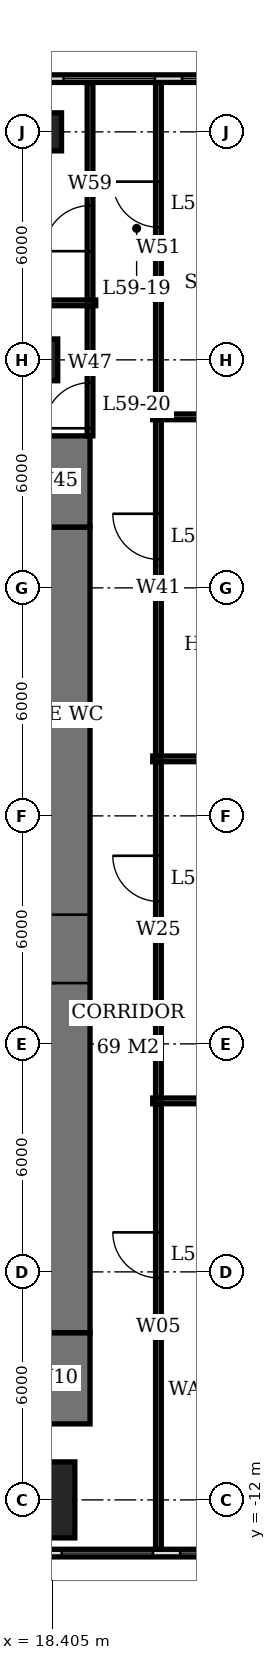
"""IFC4 building model, lengths in metres.
Left out: names, types, materials, properties, quantities, classifications, styles, units other than length and angle.
Written with IfcOpenShell. Run it as: python <this file> out.ifc"""

import sys

from ifc_helpers import new_model, si_unit, direction, frame, frame_2d, origin, origin_2d, place, context, subcontext, project, spatial, rectangle, extrude, element, fill, save


model = new_model("IFC4")
c1 = context("Model", 3, precision=1e-05, world=origin(), true_north=direction((0.0, 1.0)))
c2 = subcontext(c1, "Body", "Model", "MODEL_VIEW")
j1 = project(units=[si_unit("LENGTHUNIT", "METRE"), si_unit("PLANEANGLEUNIT", "RADIAN")], contexts=[c1])
p1 = place(None, origin())
s1 = spatial("IfcSite", under=j1, at=p1, CompositionType="ELEMENT")
p2 = place(p1, origin())
s2 = spatial("IfcBuilding", under=s1, at=p2, CompositionType="ELEMENT")
p3 = place(p2, frame((0.0, 0.0, 239.6)))
s3 = spatial("IfcBuildingStorey", under=s2, at=p3, CompositionType="ELEMENT", Elevation=239.6)
p4 = place(p3, frame((18.0, -12.0, 0.0), z_axis=(0.0, 0.0, 1.0), x_axis=(1.0, 0.0, 0.0)))
e1 = element("IfcColumn", 1, at=p4, inside=s3, PredefinedType="COLUMN", context=c2, shape_type="SweptSolid", body=[
    extrude(rectangle(XDim=2.0, YDim=2.0, at=origin_2d()), origin(), (0.0, 0.0, 1.0), 5.4),
])
p5 = place(p3, frame((18.0, 18.0, 0.0), z_axis=(0.0, 0.0, 1.0), x_axis=(1.0, 0.0, 0.0)))
e2 = element("IfcColumn", 2, at=p5, inside=s3, PredefinedType="COLUMN", context=c2, shape_type="SweptSolid", body=[
    extrude(rectangle(XDim=1.1, YDim=1.1, at=origin_2d()), origin(), (0.0, 0.0, 1.0), 5.4),
])
p6 = place(p3, frame((18.0, 24.0, 0.0), z_axis=(0.0, 0.0, 1.0), x_axis=(1.0, 0.0, 0.0)))
e3 = element("IfcColumn", 3, at=p6, inside=s3, PredefinedType="COLUMN", context=c2, shape_type="SweptSolid", body=[
    extrude(rectangle(XDim=1.3, YDim=1.0, at=origin_2d()), origin(), (0.0, 0.0, 1.0), 5.4),
])
p7 = place(p3, frame((18.5, -7.6, 0.0), z_axis=(0.0, 0.0, 1.0), x_axis=(0.0, 1.0, 0.0)))
e4 = element("IfcWall", 4, at=p7, inside=s3, PredefinedType="SHEAR", context=c2, shape_type="SweptSolid", body=[
    extrude(rectangle(XDim=21.2, YDim=1.8, at=frame_2d((10.6, 0.0))), origin(), (0.0, 0.0, 1.0), 5.4),
])
p8 = place(p7, frame((9.2, 0.0, 0.0)))
e5 = element("IfcOpeningElement", 5, at=p8, cuts=e4, PredefinedType="OPENING", context=c2, shape_type="SweptSolid", body=[
    extrude(rectangle(XDim=1.8, YDim=2.4, at=frame_2d((0.9, 1.2))), frame((0.0, 0.91, 0.0), z_axis=(0.0, -1.0, 0.0), x_axis=(1.0, 0.0, 0.0)), (0.0, 0.0, 1.0), 1.82),
])
for number, where, z_axis, x_axis in (
    (6, (18.5, -10.0, 0.0), (0.0, 0.0, 1.0), (0.0, 1.0, 0.0)),
    (7, (18.5, 13.6, 0.0), (0.0, 0.0, 1.0), (0.0, 1.0, 0.0)),
):
    element("IfcWall", number, at=place(p3, frame(where, z_axis=z_axis, x_axis=x_axis)), inside=s3, PredefinedType="SHEAR", context=c2, shape_type="SweptSolid", body=[
        extrude(rectangle(XDim=2.4, YDim=1.8, at=frame_2d((1.2, 0.0))), origin(), (0.0, 0.0, 1.0), 5.4),
    ])
p9 = place(p3, frame((-6.63, -13.4, 0.0), z_axis=(0.0, 0.0, 1.0), x_axis=(1.0, 0.0, 0.0)))
e8 = element("IfcWall", 8, at=p9, inside=s3, PredefinedType="USERDEFINED", context=c2, shape_type="SweptSolid", body=[
    extrude(rectangle(XDim=31.26, YDim=0.2, at=frame_2d((15.63, 0.0))), origin(), (0.0, 0.0, 1.0), 5.4),
])
p10 = place(p9, frame((0.358, 0.0, 0.6)))
e9 = element("IfcOpeningElement", 9, at=p10, cuts=e8, PredefinedType="OPENING", context=c2, shape_type="SweptSolid", body=[
    extrude(rectangle(XDim=2.4, YDim=3.0, at=frame_2d((1.2, 1.5))), frame((0.0, 0.11, 0.0), z_axis=(0.0, -1.0, 0.0), x_axis=(1.0, 0.0, 0.0)), (0.0, 0.0, 1.0), 0.22),
])
p11 = place(p9, frame((3.474, 0.0, 0.6)))
e10 = element("IfcOpeningElement", 10, at=p11, cuts=e8, PredefinedType="OPENING", context=c2, shape_type="SweptSolid", body=[
    extrude(rectangle(XDim=2.4, YDim=3.0, at=frame_2d((1.2, 1.5))), frame((0.0, 0.11, 0.0), z_axis=(0.0, -1.0, 0.0), x_axis=(1.0, 0.0, 0.0)), (0.0, 0.0, 1.0), 0.22),
])
p12 = place(p9, frame((6.59, 0.0, 0.6)))
e11 = element("IfcOpeningElement", 11, at=p12, cuts=e8, PredefinedType="OPENING", context=c2, shape_type="SweptSolid", body=[
    extrude(rectangle(XDim=2.4, YDim=3.0, at=frame_2d((1.2, 1.5))), frame((0.0, 0.11, 0.0), z_axis=(0.0, -1.0, 0.0), x_axis=(1.0, 0.0, 0.0)), (0.0, 0.0, 1.0), 0.22),
])
p13 = place(p9, frame((9.706, 0.0, 0.6)))
e12 = element("IfcOpeningElement", 12, at=p13, cuts=e8, PredefinedType="OPENING", context=c2, shape_type="SweptSolid", body=[
    extrude(rectangle(XDim=2.4, YDim=3.0, at=frame_2d((1.2, 1.5))), frame((0.0, 0.11, 0.0), z_axis=(0.0, -1.0, 0.0), x_axis=(1.0, 0.0, 0.0)), (0.0, 0.0, 1.0), 0.22),
])
p14 = place(p9, frame((13.572, 0.0, 0.0)))
e13 = element("IfcOpeningElement", 13, at=p14, cuts=e8, PredefinedType="OPENING", context=c2, shape_type="SweptSolid", body=[
    extrude(rectangle(XDim=1.0, YDim=2.1, at=frame_2d((0.5, 1.05))), frame((0.0, 0.11, 0.0), z_axis=(0.0, -1.0, 0.0), x_axis=(1.0, 0.0, 0.0)), (0.0, 0.0, 1.0), 0.22),
])
p15 = place(p9, frame((15.938, 0.0, 0.6)))
e14 = element("IfcOpeningElement", 14, at=p15, cuts=e8, PredefinedType="OPENING", context=c2, shape_type="SweptSolid", body=[
    extrude(rectangle(XDim=2.4, YDim=3.0, at=frame_2d((1.2, 1.5))), frame((0.0, 0.11, 0.0), z_axis=(0.0, -1.0, 0.0), x_axis=(1.0, 0.0, 0.0)), (0.0, 0.0, 1.0), 0.22),
])
p16 = place(p9, frame((19.054, 0.0, 0.6)))
e15 = element("IfcOpeningElement", 15, at=p16, cuts=e8, PredefinedType="OPENING", context=c2, shape_type="SweptSolid", body=[
    extrude(rectangle(XDim=2.4, YDim=3.0, at=frame_2d((1.2, 1.5))), frame((0.0, 0.11, 0.0), z_axis=(0.0, -1.0, 0.0), x_axis=(1.0, 0.0, 0.0)), (0.0, 0.0, 1.0), 0.22),
])
p17 = place(p9, frame((22.17, 0.0, 0.6)))
e16 = element("IfcOpeningElement", 16, at=p17, cuts=e8, PredefinedType="OPENING", context=c2, shape_type="SweptSolid", body=[
    extrude(rectangle(XDim=2.4, YDim=3.0, at=frame_2d((1.2, 1.5))), frame((0.0, 0.11, 0.0), z_axis=(0.0, -1.0, 0.0), x_axis=(1.0, 0.0, 0.0)), (0.0, 0.0, 1.0), 0.22),
])
p18 = place(p9, frame((25.286, 0.0, 0.6)))
e17 = element("IfcOpeningElement", 17, at=p18, cuts=e8, PredefinedType="OPENING", context=c2, shape_type="SweptSolid", body=[
    extrude(rectangle(XDim=2.4, YDim=3.0, at=frame_2d((1.2, 1.5))), frame((0.0, 0.11, 0.0), z_axis=(0.0, -1.0, 0.0), x_axis=(1.0, 0.0, 0.0)), (0.0, 0.0, 1.0), 0.22),
])
p19 = place(p9, frame((28.402, 0.0, 0.6)))
e18 = element("IfcOpeningElement", 18, at=p19, cuts=e8, PredefinedType="OPENING", context=c2, shape_type="SweptSolid", body=[
    extrude(rectangle(XDim=2.4, YDim=3.0, at=frame_2d((1.2, 1.5))), frame((0.0, 0.11, 0.0), z_axis=(0.0, -1.0, 0.0), x_axis=(1.0, 0.0, 0.0)), (0.0, 0.0, 1.0), 0.22),
])
p20 = place(p3, frame((24.58, 25.4, 0.0), z_axis=(0.0, 0.0, 1.0), x_axis=(-1.0, 0.0, 0.0)))
e19 = element("IfcWall", 19, at=p20, inside=s3, PredefinedType="USERDEFINED", context=c2, shape_type="SweptSolid", body=[
    extrude(rectangle(XDim=31.16, YDim=0.2, at=frame_2d((15.58, 0.0))), origin(), (0.0, 0.0, 1.0), 5.4),
])
p21 = place(p20, frame((0.358, 0.0, 0.6)))
e20 = element("IfcOpeningElement", 20, at=p21, cuts=e19, PredefinedType="OPENING", context=c2, shape_type="SweptSolid", body=[
    extrude(rectangle(XDim=2.4, YDim=3.0, at=frame_2d((1.2, 1.5))), frame((0.0, 0.11, 0.0), z_axis=(0.0, -1.0, 0.0), x_axis=(1.0, 0.0, 0.0)), (0.0, 0.0, 1.0), 0.22),
])
p22 = place(p20, frame((3.474, 0.0, 0.6)))
e21 = element("IfcOpeningElement", 21, at=p22, cuts=e19, PredefinedType="OPENING", context=c2, shape_type="SweptSolid", body=[
    extrude(rectangle(XDim=2.4, YDim=3.0, at=frame_2d((1.2, 1.5))), frame((0.0, 0.11, 0.0), z_axis=(0.0, -1.0, 0.0), x_axis=(1.0, 0.0, 0.0)), (0.0, 0.0, 1.0), 0.22),
])
p23 = place(p20, frame((6.59, 0.0, 0.6)))
e22 = element("IfcOpeningElement", 22, at=p23, cuts=e19, PredefinedType="OPENING", context=c2, shape_type="SweptSolid", body=[
    extrude(rectangle(XDim=2.4, YDim=3.0, at=frame_2d((1.2, 1.5))), frame((0.0, 0.11, 0.0), z_axis=(0.0, -1.0, 0.0), x_axis=(1.0, 0.0, 0.0)), (0.0, 0.0, 1.0), 0.22),
])
p24 = place(p20, frame((9.706, 0.0, 0.6)))
e23 = element("IfcOpeningElement", 23, at=p24, cuts=e19, PredefinedType="OPENING", context=c2, shape_type="SweptSolid", body=[
    extrude(rectangle(XDim=2.4, YDim=3.0, at=frame_2d((1.2, 1.5))), frame((0.0, 0.11, 0.0), z_axis=(0.0, -1.0, 0.0), x_axis=(1.0, 0.0, 0.0)), (0.0, 0.0, 1.0), 0.22),
])
p25 = place(p20, frame((12.822, 0.0, 0.6)))
e24 = element("IfcOpeningElement", 24, at=p25, cuts=e19, PredefinedType="OPENING", context=c2, shape_type="SweptSolid", body=[
    extrude(rectangle(XDim=2.4, YDim=3.0, at=frame_2d((1.2, 1.5))), frame((0.0, 0.11, 0.0), z_axis=(0.0, -1.0, 0.0), x_axis=(1.0, 0.0, 0.0)), (0.0, 0.0, 1.0), 0.22),
])
p26 = place(p20, frame((15.938, 0.0, 0.6)))
e25 = element("IfcOpeningElement", 25, at=p26, cuts=e19, PredefinedType="OPENING", context=c2, shape_type="SweptSolid", body=[
    extrude(rectangle(XDim=2.4, YDim=3.0, at=frame_2d((1.2, 1.5))), frame((0.0, 0.11, 0.0), z_axis=(0.0, -1.0, 0.0), x_axis=(1.0, 0.0, 0.0)), (0.0, 0.0, 1.0), 0.22),
])
p27 = place(p20, frame((19.054, 0.0, 0.6)))
e26 = element("IfcOpeningElement", 26, at=p27, cuts=e19, PredefinedType="OPENING", context=c2, shape_type="SweptSolid", body=[
    extrude(rectangle(XDim=2.4, YDim=3.0, at=frame_2d((1.2, 1.5))), frame((0.0, 0.11, 0.0), z_axis=(0.0, -1.0, 0.0), x_axis=(1.0, 0.0, 0.0)), (0.0, 0.0, 1.0), 0.22),
])
p28 = place(p20, frame((22.17, 0.0, 0.6)))
e27 = element("IfcOpeningElement", 27, at=p28, cuts=e19, PredefinedType="OPENING", context=c2, shape_type="SweptSolid", body=[
    extrude(rectangle(XDim=2.4, YDim=3.0, at=frame_2d((1.2, 1.5))), frame((0.0, 0.11, 0.0), z_axis=(0.0, -1.0, 0.0), x_axis=(1.0, 0.0, 0.0)), (0.0, 0.0, 1.0), 0.22),
])
p29 = place(p20, frame((25.286, 0.0, 0.6)))
e28 = element("IfcOpeningElement", 28, at=p29, cuts=e19, PredefinedType="OPENING", context=c2, shape_type="SweptSolid", body=[
    extrude(rectangle(XDim=2.4, YDim=3.0, at=frame_2d((1.2, 1.5))), frame((0.0, 0.11, 0.0), z_axis=(0.0, -1.0, 0.0), x_axis=(1.0, 0.0, 0.0)), (0.0, 0.0, 1.0), 0.22),
])
p30 = place(p20, frame((28.402, 0.0, 0.6)))
e29 = element("IfcOpeningElement", 29, at=p30, cuts=e19, PredefinedType="OPENING", context=c2, shape_type="SweptSolid", body=[
    extrude(rectangle(XDim=2.4, YDim=3.0, at=frame_2d((1.2, 1.5))), frame((0.0, 0.11, 0.0), z_axis=(0.0, -1.0, 0.0), x_axis=(1.0, 0.0, 0.0)), (0.0, 0.0, 1.0), 0.22),
])
p31 = place(p3, frame((4.5, 19.5, 0.0), z_axis=(0.0, 0.0, 1.0), x_axis=(1.0, 0.0, 0.0)))
e30 = element("IfcWall", 30, at=p31, inside=s3, PredefinedType="PARTITIONING", context=c2, shape_type="SweptSolid", body=[
    extrude(rectangle(XDim=15.05, YDim=0.15, at=frame_2d((7.525, 0.0))), origin(), (0.0, 0.0, 1.0), 5.15),
])
p32 = place(p3, frame((19.4, 16.0, 0.0), z_axis=(0.0, 0.0, 1.0), x_axis=(0.0, 1.0, 0.0)))
e31 = element("IfcWall", 31, at=p32, inside=s3, PredefinedType="PARTITIONING", context=c2, shape_type="SweptSolid", body=[
    extrude(rectangle(XDim=3.425, YDim=0.15, at=frame_2d((1.712, 0.0))), origin(), (0.0, 0.0, 1.0), 5.15),
])
p33 = place(p32, frame((0.2, 0.0, 0.0)))
e32 = element("IfcOpeningElement", 32, at=p33, cuts=e31, PredefinedType="OPENING", context=c2, shape_type="SweptSolid", body=[
    extrude(rectangle(XDim=1.2, YDim=2.4, at=frame_2d((0.6, 1.2))), frame((0.0, 0.085, 0.0), z_axis=(0.0, -1.0, 0.0), x_axis=(1.0, 0.0, 0.0)), (0.0, 0.0, 1.0), 0.17),
])
p34 = place(p3, frame((19.4, 19.575, 0.0), z_axis=(0.0, 0.0, 1.0), x_axis=(0.0, 1.0, 0.0)))
e33 = element("IfcWall", 33, at=p34, inside=s3, PredefinedType="PARTITIONING", context=c2, shape_type="SweptSolid", body=[
    extrude(rectangle(XDim=5.725, YDim=0.15, at=frame_2d((2.863, 0.0))), origin(), (0.0, 0.0, 1.0), 5.15),
])
p35 = place(p34, frame((1.285, 0.0, 0.0)))
e34 = element("IfcOpeningElement", 34, at=p35, cuts=e33, PredefinedType="OPENING", context=c2, shape_type="SweptSolid", body=[
    extrude(rectangle(XDim=1.2, YDim=2.4, at=frame_2d((0.6, 1.2))), frame((0.0, 0.085, 0.0), z_axis=(0.0, -1.0, 0.0), x_axis=(1.0, 0.0, 0.0)), (0.0, 0.0, 1.0), 0.17),
])
p36 = place(p3, frame((21.2, -13.3, 0.0), z_axis=(0.0, 0.0, 1.0), x_axis=(0.0, 1.0, 0.0)))
e35 = element("IfcWall", 35, at=p36, inside=s3, PredefinedType="PARTITIONING", context=c2, shape_type="SweptSolid", body=[
    extrude(rectangle(XDim=11.725, YDim=0.15, at=frame_2d((5.863, 0.0))), origin(), (0.0, 0.0, 1.0), 5.15),
])
p37 = place(p36, frame((7.14, 0.0, 0.0)))
e36 = element("IfcOpeningElement", 36, at=p37, cuts=e35, PredefinedType="OPENING", context=c2, shape_type="SweptSolid", body=[
    extrude(rectangle(XDim=1.2, YDim=2.4, at=frame_2d((0.6, 1.2))), frame((0.0, 0.085, 0.0), z_axis=(0.0, -1.0, 0.0), x_axis=(1.0, 0.0, 0.0)), (0.0, 0.0, 1.0), 0.17),
])
p38 = place(p3, frame((21.2, -1.425, 0.0), z_axis=(0.0, 0.0, 1.0), x_axis=(0.0, 1.0, 0.0)))
e37 = element("IfcWall", 37, at=p38, inside=s3, PredefinedType="PARTITIONING", context=c2, shape_type="SweptSolid", body=[
    extrude(rectangle(XDim=8.85, YDim=0.15, at=frame_2d((4.425, 0.0))), origin(), (0.0, 0.0, 1.0), 5.15),
])
p39 = place(p38, frame((5.175, 0.0, 0.0)))
e38 = element("IfcOpeningElement", 38, at=p39, cuts=e37, PredefinedType="OPENING", context=c2, shape_type="SweptSolid", body=[
    extrude(rectangle(XDim=1.2, YDim=2.4, at=frame_2d((0.6, 1.2))), frame((0.0, 0.085, 0.0), z_axis=(0.0, -1.0, 0.0), x_axis=(1.0, 0.0, 0.0)), (0.0, 0.0, 1.0), 0.17),
])
p40 = place(p3, frame((21.05, -1.5, 0.0), z_axis=(0.0, 0.0, 1.0), x_axis=(1.0, 0.0, 0.0)))
e39 = element("IfcWall", 39, at=p40, inside=s3, PredefinedType="PARTITIONING", context=c2, shape_type="SweptSolid", body=[
    extrude(rectangle(XDim=6.54, YDim=0.15, at=frame_2d((3.27, 0.0))), origin(), (0.0, 0.0, 1.0), 5.15),
])
p41 = place(p3, frame((21.2, 7.575, 0.0), z_axis=(0.0, 0.0, 1.0), x_axis=(0.0, 1.0, 0.0)))
e40 = element("IfcWall", 40, at=p41, inside=s3, PredefinedType="PARTITIONING", context=c2, shape_type="SweptSolid", body=[
    extrude(rectangle(XDim=8.85, YDim=0.15, at=frame_2d((4.425, 0.0))), origin(), (0.0, 0.0, 1.0), 5.15),
])
p42 = place(p41, frame((5.175, 0.0, 0.0)))
e41 = element("IfcOpeningElement", 41, at=p42, cuts=e40, PredefinedType="OPENING", context=c2, shape_type="SweptSolid", body=[
    extrude(rectangle(XDim=1.2, YDim=2.4, at=frame_2d((0.6, 1.2))), frame((0.0, 0.085, 0.0), z_axis=(0.0, -1.0, 0.0), x_axis=(1.0, 0.0, 0.0)), (0.0, 0.0, 1.0), 0.17),
])
p43 = place(p3, frame((21.05, 7.5, 0.0), z_axis=(0.0, 0.0, 1.0), x_axis=(1.0, 0.0, 0.0)))
e42 = element("IfcWall", 42, at=p43, inside=s3, PredefinedType="PARTITIONING", context=c2, shape_type="SweptSolid", body=[
    extrude(rectangle(XDim=6.54, YDim=0.15, at=frame_2d((3.27, 0.0))), origin(), (0.0, 0.0, 1.0), 5.15),
])
p44 = place(p3, frame((21.2, 16.575, 0.0), z_axis=(0.0, 0.0, 1.0), x_axis=(0.0, 1.0, 0.0)))
e43 = element("IfcWall", 43, at=p44, inside=s3, PredefinedType="PARTITIONING", context=c2, shape_type="SweptSolid", body=[
    extrude(rectangle(XDim=8.725, YDim=0.15, at=frame_2d((4.363, 0.0))), origin(), (0.0, 0.0, 1.0), 5.15),
])
p45 = place(p44, frame((4.915, 0.0, 0.0)))
e44 = element("IfcOpeningElement", 44, at=p45, cuts=e43, PredefinedType="OPENING", context=c2, shape_type="SweptSolid", body=[
    extrude(rectangle(XDim=1.2, YDim=2.4, at=frame_2d((0.6, 1.2))), frame((0.0, 0.085, 0.0), z_axis=(0.0, -1.0, 0.0), x_axis=(1.0, 0.0, 0.0)), (0.0, 0.0, 1.0), 0.17),
])
p46 = place(p3, frame((21.05, 16.5, 0.0), z_axis=(0.0, 0.0, 1.0), x_axis=(1.0, 0.0, 0.0)))
e45 = element("IfcWall", 45, at=p46, inside=s3, PredefinedType="PARTITIONING", context=c2, shape_type="SweptSolid", body=[
    extrude(rectangle(XDim=6.54, YDim=0.15, at=frame_2d((3.27, 0.0))), origin(), (0.0, 0.0, 1.0), 5.15),
])
p47 = place(p18, origin())
e46 = element("IfcWindow", 46, at=p47, inside=s3, PartitioningType="SINGLE_PANEL", PredefinedType="USERDEFINED", context=c2, shape_type="SweptSolid", body=[
    extrude(rectangle(XDim=2.4, YDim=3.0, at=frame_2d((1.2, 1.5))), frame((0.0, 0.03, 0.0), z_axis=(0.0, -1.0, 0.0), x_axis=(1.0, 0.0, 0.0)), (0.0, 0.0, 1.0), 0.06),
])
fill(e17, e46)
p48 = place(p19, origin())
e47 = element("IfcWindow", 47, at=p48, inside=s3, PartitioningType="SINGLE_PANEL", PredefinedType="USERDEFINED", context=c2, shape_type="SweptSolid", body=[
    extrude(rectangle(XDim=2.4, YDim=3.0, at=frame_2d((1.2, 1.5))), frame((0.0, 0.03, 0.0), z_axis=(0.0, -1.0, 0.0), x_axis=(1.0, 0.0, 0.0)), (0.0, 0.0, 1.0), 0.06),
])
fill(e18, e47)
p49 = place(p21, origin())
e48 = element("IfcWindow", 48, at=p49, inside=s3, PartitioningType="SINGLE_PANEL", PredefinedType="USERDEFINED", context=c2, shape_type="SweptSolid", body=[
    extrude(rectangle(XDim=2.4, YDim=3.0, at=frame_2d((1.2, 1.5))), frame((0.0, 0.03, 0.0), z_axis=(0.0, -1.0, 0.0), x_axis=(1.0, 0.0, 0.0)), (0.0, 0.0, 1.0), 0.06),
])
fill(e20, e48)
p50 = place(p22, origin())
e49 = element("IfcWindow", 49, at=p50, inside=s3, PartitioningType="SINGLE_PANEL", PredefinedType="USERDEFINED", context=c2, shape_type="SweptSolid", body=[
    extrude(rectangle(XDim=2.4, YDim=3.0, at=frame_2d((1.2, 1.5))), frame((0.0, 0.03, 0.0), z_axis=(0.0, -1.0, 0.0), x_axis=(1.0, 0.0, 0.0)), (0.0, 0.0, 1.0), 0.06),
])
fill(e21, e49)
p51 = place(p8, origin())
e50 = element("IfcDoor", 50, at=p51, inside=s3, OperationType="DOUBLE_DOOR_SINGLE_SWING", PredefinedType="DOOR", context=c2, shape_type="SweptSolid", body=[
    extrude(rectangle(XDim=1.8, YDim=2.4, at=frame_2d((0.9, 1.2))), frame((0.0, 0.025, 0.0), z_axis=(0.0, -1.0, 0.0), x_axis=(1.0, 0.0, 0.0)), (0.0, 0.0, 1.0), 0.05),
])
fill(e5, e50)
p52 = place(p37, origin())
e51 = element("IfcDoor", 51, at=p52, inside=s3, OperationType="SINGLE_SWING_RIGHT", PredefinedType="DOOR", context=c2, shape_type="SweptSolid", body=[
    extrude(rectangle(XDim=1.2, YDim=2.4, at=frame_2d((0.6, 1.2))), frame((0.0, 0.025, 0.0), z_axis=(0.0, -1.0, 0.0), x_axis=(1.0, 0.0, 0.0)), (0.0, 0.0, 1.0), 0.05),
])
fill(e36, e51)
p53 = place(p39, origin())
e52 = element("IfcDoor", 52, at=p53, inside=s3, OperationType="SINGLE_SWING_RIGHT", PredefinedType="DOOR", context=c2, shape_type="SweptSolid", body=[
    extrude(rectangle(XDim=1.2, YDim=2.4, at=frame_2d((0.6, 1.2))), frame((0.0, 0.025, 0.0), z_axis=(0.0, -1.0, 0.0), x_axis=(1.0, 0.0, 0.0)), (0.0, 0.0, 1.0), 0.05),
])
fill(e38, e52)
p54 = place(p42, origin())
e53 = element("IfcDoor", 53, at=p54, inside=s3, OperationType="SINGLE_SWING_RIGHT", PredefinedType="DOOR", context=c2, shape_type="SweptSolid", body=[
    extrude(rectangle(XDim=1.2, YDim=2.4, at=frame_2d((0.6, 1.2))), frame((0.0, 0.025, 0.0), z_axis=(0.0, -1.0, 0.0), x_axis=(1.0, 0.0, 0.0)), (0.0, 0.0, 1.0), 0.05),
])
fill(e41, e53)
p55 = place(p45, origin())
e54 = element("IfcDoor", 54, at=p55, inside=s3, OperationType="SINGLE_SWING_RIGHT", PredefinedType="DOOR", context=c2, shape_type="SweptSolid", body=[
    extrude(rectangle(XDim=1.2, YDim=2.4, at=frame_2d((0.6, 1.2))), frame((0.0, 0.025, 0.0), z_axis=(0.0, -1.0, 0.0), x_axis=(1.0, 0.0, 0.0)), (0.0, 0.0, 1.0), 0.05),
])
fill(e44, e54)
p56 = place(p35, origin())
e55 = element("IfcDoor", 55, at=p56, inside=s3, OperationType="SINGLE_SWING_LEFT", PredefinedType="DOOR", context=c2, shape_type="SweptSolid", body=[
    extrude(rectangle(XDim=1.2, YDim=2.4, at=frame_2d((0.6, 1.2))), frame((0.0, 0.025, 0.0), z_axis=(0.0, -1.0, 0.0), x_axis=(1.0, 0.0, 0.0)), (0.0, 0.0, 1.0), 0.05),
])
fill(e34, e55)
p57 = place(p33, origin())
e56 = element("IfcDoor", 56, at=p57, inside=s3, OperationType="SINGLE_SWING_LEFT", PredefinedType="DOOR", context=c2, shape_type="SweptSolid", body=[
    extrude(rectangle(XDim=1.2, YDim=2.4, at=frame_2d((0.6, 1.2))), frame((0.0, 0.025, 0.0), z_axis=(0.0, -1.0, 0.0), x_axis=(1.0, 0.0, 0.0)), (0.0, 0.0, 1.0), 0.05),
])
fill(e32, e56)
save(model, sys.argv[1])
